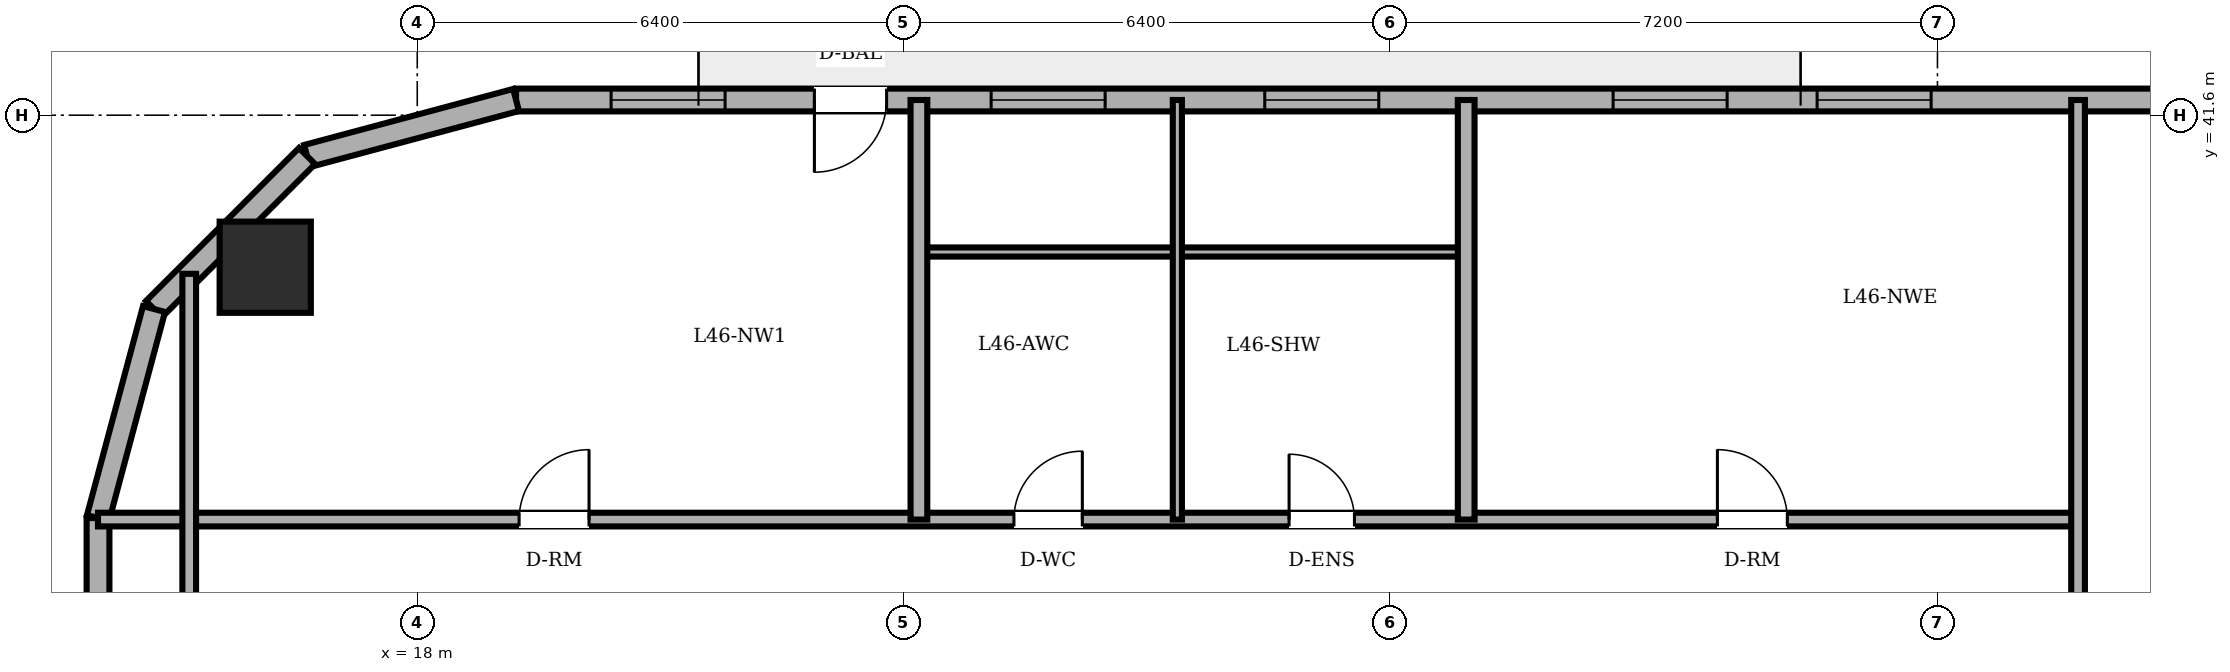
"""IFC4 building model, lengths in metres.
Left out: names, types, materials, properties, quantities, classifications, styles, units other than length and angle.
Written with IfcOpenShell. Run it as: python <this file> out.ifc"""

import sys

from ifc_helpers import new_model, si_unit, direction, frame, frame_2d, origin, origin_2d, place, context, subcontext, project, spatial, rectangle, circle, extrude, element, fill, save


model = new_model("IFC4")
c1 = context("Model", 3, precision=1e-05, world=origin(), true_north=direction((0.0, 1.0)))
c2 = subcontext(c1, "Body", "Model", "MODEL_VIEW")
j1 = project(units=[si_unit("LENGTHUNIT", "METRE"), si_unit("PLANEANGLEUNIT", "RADIAN")], contexts=[c1])
p1 = place(None, origin())
s1 = spatial("IfcSite", under=j1, at=p1, CompositionType="ELEMENT")
p2 = place(p1, origin())
s2 = spatial("IfcBuilding", under=s1, at=p2, CompositionType="ELEMENT")
p3 = place(p2, frame((0.0, 0.0, 176.2)))
s3 = spatial("IfcBuildingStorey", under=s2, at=p3, CompositionType="ELEMENT", Elevation=176.2)
p4 = place(p3, frame((16.0, 39.6, 0.0), z_axis=(0.0, 0.0, 1.0), x_axis=(1.0, 0.0, 0.0)))
e1 = element("IfcColumn", 1, at=p4, inside=s3, PredefinedType="COLUMN", context=c2, shape_type="SweptSolid", body=[
    extrude(circle(Radius=0.6, at=origin_2d()), origin(), (0.0, 0.0, 1.0), 3.6),
])
p5 = place(p3, frame((49.582, 41.8, 0.0), z_axis=(0.0, 0.0, 1.0), x_axis=(-1.0, 0.0, 0.0)))
e2 = element("IfcWall", 2, at=p5, inside=s3, PredefinedType="SOLIDWALL", context=c2, shape_type="SweptSolid", body=[
    extrude(rectangle(XDim=30.282, YDim=0.3, at=frame_2d((15.141, 0.0))), origin(), (0.0, 0.0, 1.0), 3.4),
])
p6 = place(p5, frame((25.407, 0.0, 0.0)))
e3 = element("IfcOpeningElement", 3, at=p6, cuts=e2, PredefinedType="OPENING", context=c2, shape_type="SweptSolid", body=[
    extrude(rectangle(XDim=0.95, YDim=2.2, at=frame_2d((0.475, 1.1))), frame((0.0, 0.16, 0.0), z_axis=(0.0, -1.0, 0.0), x_axis=(1.0, 0.0, 0.0)), (0.0, 0.0, 1.0), 0.32),
])
p7 = place(p5, frame((1.527, 0.0, 0.85)))
e4 = element("IfcOpeningElement", 4, at=p7, cuts=e2, PredefinedType="OPENING", context=c2, shape_type="SweptSolid", body=[
    extrude(rectangle(XDim=1.5, YDim=1.55, at=frame_2d((0.75, 0.775))), frame((0.0, 0.16, 0.0), z_axis=(0.0, -1.0, 0.0), x_axis=(1.0, 0.0, 0.0)), (0.0, 0.0, 1.0), 0.32),
])
p8 = place(p5, frame((3.455, 0.0, 0.85)))
e5 = element("IfcOpeningElement", 5, at=p8, cuts=e2, PredefinedType="OPENING", context=c2, shape_type="SweptSolid", body=[
    extrude(rectangle(XDim=1.5, YDim=1.55, at=frame_2d((0.75, 0.775))), frame((0.0, 0.16, 0.0), z_axis=(0.0, -1.0, 0.0), x_axis=(1.0, 0.0, 0.0)), (0.0, 0.0, 1.0), 0.32),
])
p9 = place(p5, frame((7.182, 0.0, 0.85)))
e6 = element("IfcOpeningElement", 6, at=p9, cuts=e2, PredefinedType="OPENING", context=c2, shape_type="SweptSolid", body=[
    extrude(rectangle(XDim=1.5, YDim=1.55, at=frame_2d((0.75, 0.775))), frame((0.0, 0.16, 0.0), z_axis=(0.0, -1.0, 0.0), x_axis=(1.0, 0.0, 0.0)), (0.0, 0.0, 1.0), 0.32),
])
p10 = place(p5, frame((11.665, 0.0, 0.85)))
e7 = element("IfcOpeningElement", 7, at=p10, cuts=e2, PredefinedType="OPENING", context=c2, shape_type="SweptSolid", body=[
    extrude(rectangle(XDim=1.5, YDim=1.55, at=frame_2d((0.75, 0.775))), frame((0.0, 0.16, 0.0), z_axis=(0.0, -1.0, 0.0), x_axis=(1.0, 0.0, 0.0)), (0.0, 0.0, 1.0), 0.32),
])
p11 = place(p5, frame((14.349, 0.0, 0.85)))
e8 = element("IfcOpeningElement", 8, at=p11, cuts=e2, PredefinedType="OPENING", context=c2, shape_type="SweptSolid", body=[
    extrude(rectangle(XDim=1.5, YDim=1.55, at=frame_2d((0.75, 0.775))), frame((0.0, 0.16, 0.0), z_axis=(0.0, -1.0, 0.0), x_axis=(1.0, 0.0, 0.0)), (0.0, 0.0, 1.0), 0.32),
])
p12 = place(p5, frame((18.932, 0.0, 0.85)))
e9 = element("IfcOpeningElement", 9, at=p12, cuts=e2, PredefinedType="OPENING", context=c2, shape_type="SweptSolid", body=[
    extrude(rectangle(XDim=1.5, YDim=1.55, at=frame_2d((0.75, 0.775))), frame((0.0, 0.16, 0.0), z_axis=(0.0, -1.0, 0.0), x_axis=(1.0, 0.0, 0.0)), (0.0, 0.0, 1.0), 0.32),
])
p13 = place(p5, frame((22.532, 0.0, 0.85)))
e10 = element("IfcOpeningElement", 10, at=p13, cuts=e2, PredefinedType="OPENING", context=c2, shape_type="SweptSolid", body=[
    extrude(rectangle(XDim=1.5, YDim=1.55, at=frame_2d((0.75, 0.775))), frame((0.0, 0.16, 0.0), z_axis=(0.0, -1.0, 0.0), x_axis=(1.0, 0.0, 0.0)), (0.0, 0.0, 1.0), 0.32),
])
p14 = place(p5, frame((27.532, 0.0, 0.85)))
e11 = element("IfcOpeningElement", 11, at=p14, cuts=e2, PredefinedType="OPENING", context=c2, shape_type="SweptSolid", body=[
    extrude(rectangle(XDim=1.5, YDim=1.55, at=frame_2d((0.75, 0.775))), frame((0.0, 0.16, 0.0), z_axis=(0.0, -1.0, 0.0), x_axis=(1.0, 0.0, 0.0)), (0.0, 0.0, 1.0), 0.32),
])
p15 = place(p3, frame((19.3, 41.8, 0.0), z_axis=(0.0, 0.0, 1.0), x_axis=(-0.965908238586, -0.258884674387, 0.0)))
e12 = element("IfcWall", 12, at=p15, inside=s3, PredefinedType="SOLIDWALL", context=c2, shape_type="SweptSolid", body=[
    extrude(rectangle(XDim=2.847, YDim=0.3, at=frame_2d((1.424, 0.0))), origin(), (0.0, 0.0, 1.0), 3.4),
])
p16 = place(p3, frame((16.55, 41.063, 0.0), z_axis=(0.0, 0.0, 1.0), x_axis=(-0.707106781187, -0.707106781187, 0.0)))
e13 = element("IfcWall", 13, at=p16, inside=s3, PredefinedType="SOLIDWALL", context=c2, shape_type="SweptSolid", body=[
    extrude(rectangle(XDim=2.847, YDim=0.3, at=frame_2d((1.423, 0.0))), origin(), (0.0, 0.0, 1.0), 3.4),
])
p17 = place(p3, frame((14.537, 39.05, 0.0), z_axis=(0.0, 0.0, 1.0), x_axis=(-0.258884674387, -0.965908238586, 0.0)))
e14 = element("IfcWall", 14, at=p17, inside=s3, PredefinedType="SOLIDWALL", context=c2, shape_type="SweptSolid", body=[
    extrude(rectangle(XDim=2.847, YDim=0.3, at=frame_2d((1.424, 0.0))), origin(), (0.0, 0.0, 1.0), 3.4),
])
p18 = place(p3, frame((13.8, 36.3, 0.0), z_axis=(0.0, 0.0, 1.0), x_axis=(0.0, -1.0, 0.0)))
e15 = element("IfcWall", 15, at=p18, inside=s3, PredefinedType="SOLIDWALL", context=c2, shape_type="SweptSolid", body=[
    extrude(rectangle(XDim=24.6, YDim=0.3, at=frame_2d((12.3, 0.0))), origin(), (0.0, 0.0, 1.0), 3.4),
])
p19 = place(p18, frame((5.003, 0.0, 0.85)))
e16 = element("IfcOpeningElement", 16, at=p19, cuts=e15, PredefinedType="OPENING", context=c2, shape_type="SweptSolid", body=[
    extrude(rectangle(XDim=1.5, YDim=1.55, at=frame_2d((0.75, 0.775))), frame((0.0, 0.16, 0.0), z_axis=(0.0, -1.0, 0.0), x_axis=(1.0, 0.0, 0.0)), (0.0, 0.0, 1.0), 0.32),
])
p20 = place(p18, frame((8.277, 0.0, 0.85)))
e17 = element("IfcOpeningElement", 17, at=p20, cuts=e15, PredefinedType="OPENING", context=c2, shape_type="SweptSolid", body=[
    extrude(rectangle(XDim=1.5, YDim=1.55, at=frame_2d((0.75, 0.775))), frame((0.0, 0.16, 0.0), z_axis=(0.0, -1.0, 0.0), x_axis=(1.0, 0.0, 0.0)), (0.0, 0.0, 1.0), 0.32),
])
p21 = place(p18, frame((14.823, 0.0, 0.85)))
e18 = element("IfcOpeningElement", 18, at=p21, cuts=e15, PredefinedType="OPENING", context=c2, shape_type="SweptSolid", body=[
    extrude(rectangle(XDim=1.5, YDim=1.55, at=frame_2d((0.75, 0.775))), frame((0.0, 0.16, 0.0), z_axis=(0.0, -1.0, 0.0), x_axis=(1.0, 0.0, 0.0)), (0.0, 0.0, 1.0), 0.32),
])
p22 = place(p18, frame((18.097, 0.0, 0.85)))
e19 = element("IfcOpeningElement", 19, at=p22, cuts=e15, PredefinedType="OPENING", context=c2, shape_type="SweptSolid", body=[
    extrude(rectangle(XDim=1.5, YDim=1.55, at=frame_2d((0.75, 0.775))), frame((0.0, 0.16, 0.0), z_axis=(0.0, -1.0, 0.0), x_axis=(1.0, 0.0, 0.0)), (0.0, 0.0, 1.0), 0.32),
])
p23 = place(p3, frame((13.8, 36.28, 0.0), z_axis=(0.0, 0.0, 1.0), x_axis=(1.0, 0.0, 0.0)))
e20 = element("IfcWall", 20, at=p23, inside=s3, PredefinedType="PARTITIONING", context=c2, shape_type="SweptSolid", body=[
    extrude(rectangle(XDim=26.05, YDim=0.18, at=frame_2d((13.025, 0.0))), origin(), (0.0, 0.0, 1.0), 3.4),
])
p24 = place(p23, frame((12.05, 0.0, 0.0)))
e21 = element("IfcOpeningElement", 21, at=p24, cuts=e20, PredefinedType="OPENING", context=c2, shape_type="SweptSolid", body=[
    extrude(rectangle(XDim=0.9, YDim=2.1, at=frame_2d((0.45, 1.05))), frame((0.0, 0.1, 0.0), z_axis=(0.0, -1.0, 0.0), x_axis=(1.0, 0.0, 0.0)), (0.0, 0.0, 1.0), 0.2),
])
p25 = place(p23, frame((15.67, 0.0, 0.0)))
e22 = element("IfcOpeningElement", 22, at=p25, cuts=e20, PredefinedType="OPENING", context=c2, shape_type="SweptSolid", body=[
    extrude(rectangle(XDim=0.86, YDim=2.1, at=frame_2d((0.43, 1.05))), frame((0.0, 0.1, 0.0), z_axis=(0.0, -1.0, 0.0), x_axis=(1.0, 0.0, 0.0)), (0.0, 0.0, 1.0), 0.2),
])
p26 = place(p23, frame((5.54, 0.0, 0.0)))
e23 = element("IfcOpeningElement", 23, at=p26, cuts=e20, PredefinedType="OPENING", context=c2, shape_type="SweptSolid", body=[
    extrude(rectangle(XDim=0.92, YDim=2.1, at=frame_2d((0.46, 1.05))), frame((0.0, 0.1, 0.0), z_axis=(0.0, -1.0, 0.0), x_axis=(1.0, 0.0, 0.0)), (0.0, 0.0, 1.0), 0.2),
])
p27 = place(p23, frame((21.305, 0.0, 0.0)))
e24 = element("IfcOpeningElement", 24, at=p27, cuts=e20, PredefinedType="OPENING", context=c2, shape_type="SweptSolid", body=[
    extrude(rectangle(XDim=0.92, YDim=2.1, at=frame_2d((0.46, 1.05))), frame((0.0, 0.1, 0.0), z_axis=(0.0, -1.0, 0.0), x_axis=(1.0, 0.0, 0.0)), (0.0, 0.0, 1.0), 0.2),
])
p28 = place(p3, frame((24.6, 39.8, 0.0), z_axis=(0.0, 0.0, 1.0), x_axis=(1.0, 0.0, 0.0)))
e25 = element("IfcWall", 25, at=p28, inside=s3, PredefinedType="PARTITIONING", context=c2, shape_type="SweptSolid", body=[
    extrude(rectangle(XDim=7.2, YDim=0.12, at=frame_2d((3.6, 0.0))), origin(), (0.0, 0.0, 1.0), 2.882),
])
p29 = place(p3, frame((15.0, 33.82, 0.0), z_axis=(0.0, 0.0, 1.0), x_axis=(0.0, 1.0, 0.0)))
e26 = element("IfcWall", 26, at=p29, inside=s3, PredefinedType="PARTITIONING", context=c2, shape_type="SweptSolid", body=[
    extrude(rectangle(XDim=5.693, YDim=0.18, at=frame_2d((2.846, 0.0))), origin(), (0.0, 0.0, 1.0), 3.4),
])
p30 = place(p3, frame((24.6, 36.28, 0.0), z_axis=(0.0, 0.0, 1.0), x_axis=(0.0, 1.0, 0.0)))
e27 = element("IfcWall", 27, at=p30, inside=s3, PredefinedType="PARTITIONING", context=c2, shape_type="SweptSolid", body=[
    extrude(rectangle(XDim=5.52, YDim=0.22, at=frame_2d((2.76, 0.0))), origin(), (0.0, 0.0, 1.0), 3.4),
])
p31 = place(p3, frame((28.0, 36.28, 0.0), z_axis=(0.0, 0.0, 1.0), x_axis=(0.0, 1.0, 0.0)))
e28 = element("IfcWall", 28, at=p31, inside=s3, PredefinedType="PARTITIONING", context=c2, shape_type="SweptSolid", body=[
    extrude(rectangle(XDim=5.52, YDim=0.12, at=frame_2d((2.76, 0.0))), origin(), (0.0, 0.0, 1.0), 3.4),
])
p32 = place(p3, frame((31.8, 36.28, 0.0), z_axis=(0.0, 0.0, 1.0), x_axis=(0.0, 1.0, 0.0)))
e29 = element("IfcWall", 29, at=p32, inside=s3, PredefinedType="PARTITIONING", context=c2, shape_type="SweptSolid", body=[
    extrude(rectangle(XDim=5.52, YDim=0.22, at=frame_2d((2.76, 0.0))), origin(), (0.0, 0.0, 1.0), 3.4),
])
p33 = place(p3, frame((39.85, 25.18, 0.0), z_axis=(0.0, 0.0, 1.0), x_axis=(0.0, 1.0, 0.0)))
e30 = element("IfcWall", 30, at=p33, inside=s3, PredefinedType="PARTITIONING", context=c2, shape_type="SweptSolid", body=[
    extrude(rectangle(XDim=16.62, YDim=0.18, at=frame_2d((8.31, 0.0))), origin(), (0.0, 0.0, 1.0), 3.4),
])
p34 = place(p33, frame((5.35, 0.0, 0.0)))
e31 = element("IfcOpeningElement", 31, at=p34, cuts=e30, PredefinedType="OPENING", context=c2, shape_type="SweptSolid", body=[
    extrude(rectangle(XDim=0.92, YDim=2.1, at=frame_2d((0.46, 1.05))), frame((0.0, 0.1, 0.0), z_axis=(0.0, -1.0, 0.0), x_axis=(1.0, 0.0, 0.0)), (0.0, 0.0, 1.0), 0.2),
])
p35 = place(p6, origin())
e32 = element("IfcDoor", 32, at=p35, inside=s3, OperationType="SINGLE_SWING_RIGHT", PredefinedType="DOOR", context=c2, shape_type="SweptSolid", body=[
    extrude(rectangle(XDim=0.95, YDim=2.2, at=frame_2d((0.475, 1.1))), frame((0.0, 0.025, 0.0), z_axis=(0.0, -1.0, 0.0), x_axis=(1.0, 0.0, 0.0)), (0.0, 0.0, 1.0), 0.05),
])
fill(e3, e32)
p36 = place(p10, origin())
e33 = element("IfcWindow", 33, at=p36, inside=s3, PartitioningType="DOUBLE_PANEL_VERTICAL", PredefinedType="WINDOW", context=c2, shape_type="SweptSolid", body=[
    extrude(rectangle(XDim=1.5, YDim=1.55, at=frame_2d((0.75, 0.775))), frame((0.0, 0.03, 0.0), z_axis=(0.0, -1.0, 0.0), x_axis=(1.0, 0.0, 0.0)), (0.0, 0.0, 1.0), 0.06),
])
fill(e7, e33)
p37 = place(p11, origin())
e34 = element("IfcWindow", 34, at=p37, inside=s3, PartitioningType="DOUBLE_PANEL_VERTICAL", PredefinedType="WINDOW", context=c2, shape_type="SweptSolid", body=[
    extrude(rectangle(XDim=1.5, YDim=1.55, at=frame_2d((0.75, 0.775))), frame((0.0, 0.03, 0.0), z_axis=(0.0, -1.0, 0.0), x_axis=(1.0, 0.0, 0.0)), (0.0, 0.0, 1.0), 0.06),
])
fill(e8, e34)
p38 = place(p12, origin())
e35 = element("IfcWindow", 35, at=p38, inside=s3, PartitioningType="DOUBLE_PANEL_VERTICAL", PredefinedType="WINDOW", context=c2, shape_type="SweptSolid", body=[
    extrude(rectangle(XDim=1.5, YDim=1.55, at=frame_2d((0.75, 0.775))), frame((0.0, 0.03, 0.0), z_axis=(0.0, -1.0, 0.0), x_axis=(1.0, 0.0, 0.0)), (0.0, 0.0, 1.0), 0.06),
])
fill(e9, e35)
p39 = place(p13, origin())
e36 = element("IfcWindow", 36, at=p39, inside=s3, PartitioningType="DOUBLE_PANEL_VERTICAL", PredefinedType="WINDOW", context=c2, shape_type="SweptSolid", body=[
    extrude(rectangle(XDim=1.5, YDim=1.55, at=frame_2d((0.75, 0.775))), frame((0.0, 0.03, 0.0), z_axis=(0.0, -1.0, 0.0), x_axis=(1.0, 0.0, 0.0)), (0.0, 0.0, 1.0), 0.06),
])
fill(e10, e36)
p40 = place(p14, origin())
e37 = element("IfcWindow", 37, at=p40, inside=s3, PartitioningType="DOUBLE_PANEL_VERTICAL", PredefinedType="WINDOW", context=c2, shape_type="SweptSolid", body=[
    extrude(rectangle(XDim=1.5, YDim=1.55, at=frame_2d((0.75, 0.775))), frame((0.0, 0.03, 0.0), z_axis=(0.0, -1.0, 0.0), x_axis=(1.0, 0.0, 0.0)), (0.0, 0.0, 1.0), 0.06),
])
fill(e11, e37)
p41 = place(p24, origin())
e38 = element("IfcDoor", 38, at=p41, inside=s3, OperationType="SINGLE_SWING_RIGHT", PredefinedType="DOOR", context=c2, shape_type="SweptSolid", body=[
    extrude(rectangle(XDim=0.9, YDim=2.1, at=frame_2d((0.45, 1.05))), frame((0.0, 0.025, 0.0), z_axis=(0.0, -1.0, 0.0), x_axis=(1.0, 0.0, 0.0)), (0.0, 0.0, 1.0), 0.05),
])
fill(e21, e38)
p42 = place(p25, origin())
e39 = element("IfcDoor", 39, at=p42, inside=s3, OperationType="SINGLE_SWING_LEFT", PredefinedType="DOOR", context=c2, shape_type="SweptSolid", body=[
    extrude(rectangle(XDim=0.86, YDim=2.1, at=frame_2d((0.43, 1.05))), frame((0.0, 0.025, 0.0), z_axis=(0.0, -1.0, 0.0), x_axis=(1.0, 0.0, 0.0)), (0.0, 0.0, 1.0), 0.05),
])
fill(e22, e39)
p43 = place(p26, origin())
e40 = element("IfcDoor", 40, at=p43, inside=s3, OperationType="SINGLE_SWING_RIGHT", PredefinedType="DOOR", context=c2, shape_type="SweptSolid", body=[
    extrude(rectangle(XDim=0.92, YDim=2.1, at=frame_2d((0.46, 1.05))), frame((0.0, 0.025, 0.0), z_axis=(0.0, -1.0, 0.0), x_axis=(1.0, 0.0, 0.0)), (0.0, 0.0, 1.0), 0.05),
])
fill(e23, e40)
p44 = place(p27, origin())
e41 = element("IfcDoor", 41, at=p44, inside=s3, OperationType="SINGLE_SWING_LEFT", PredefinedType="DOOR", context=c2, shape_type="SweptSolid", body=[
    extrude(rectangle(XDim=0.92, YDim=2.1, at=frame_2d((0.46, 1.05))), frame((0.0, 0.025, 0.0), z_axis=(0.0, -1.0, 0.0), x_axis=(1.0, 0.0, 0.0)), (0.0, 0.0, 1.0), 0.05),
])
fill(e24, e41)
save(model, sys.argv[1])
